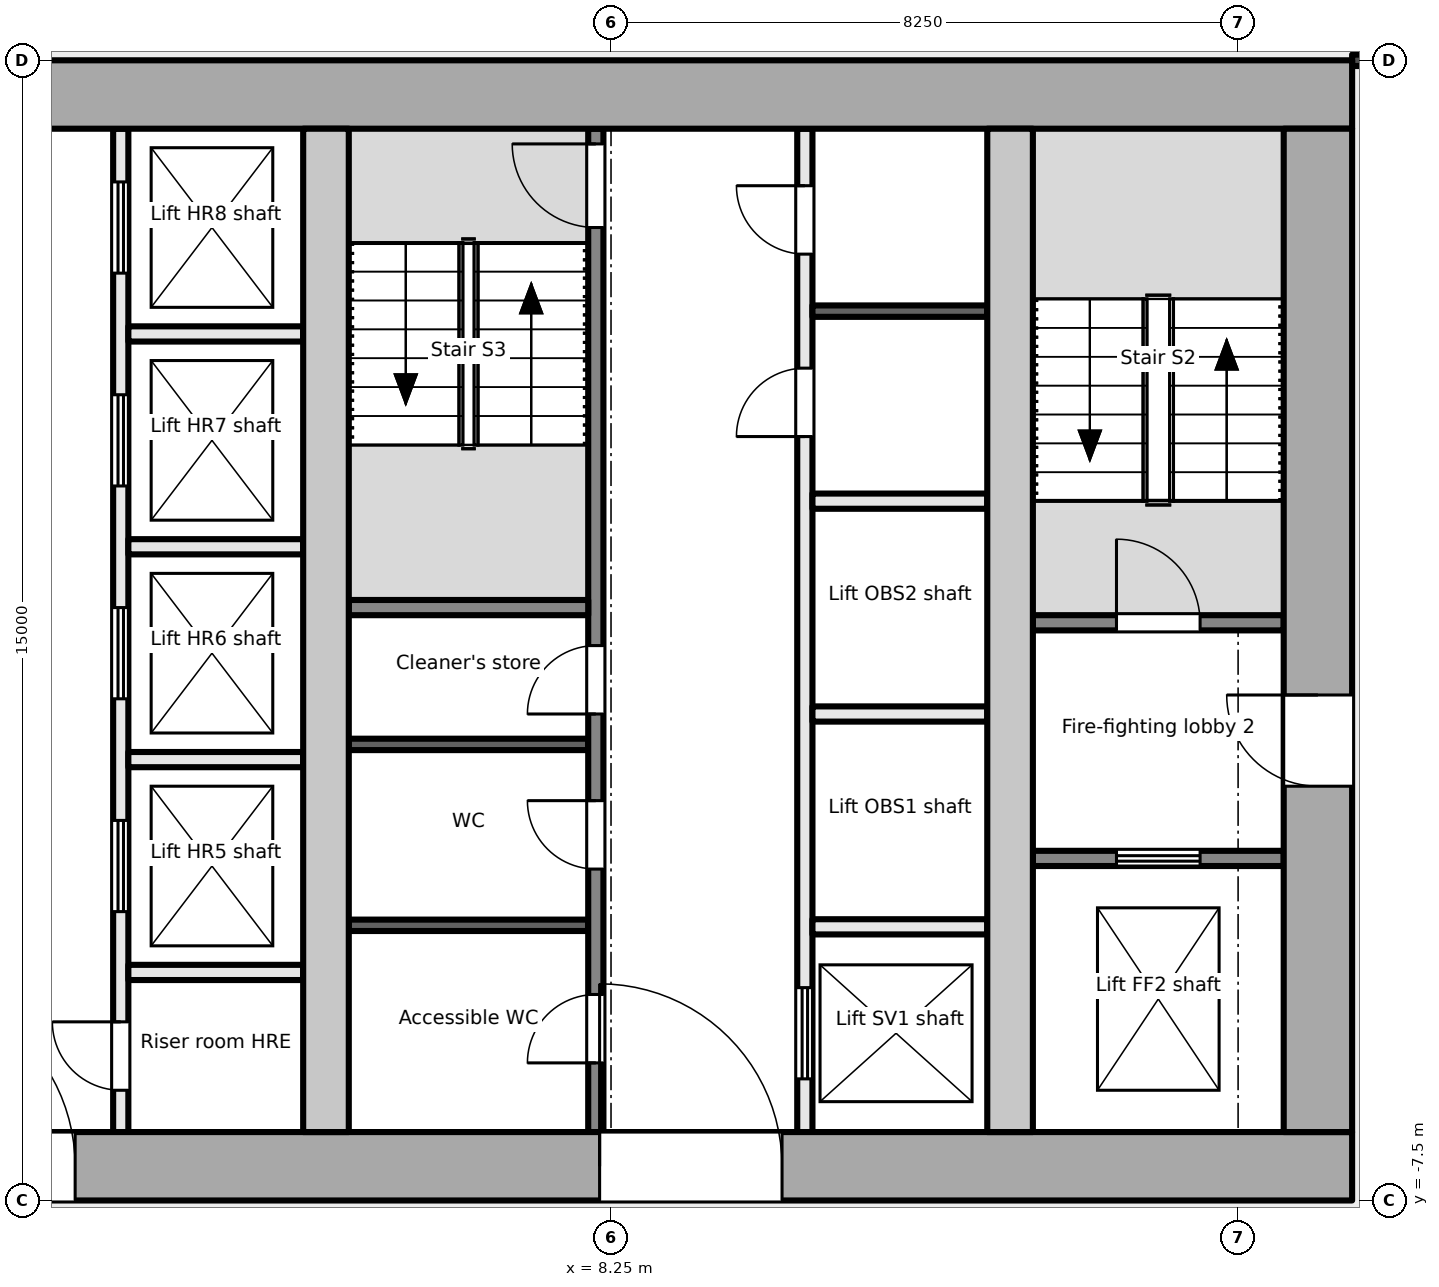
"""IFC4 building model, lengths in metres.
Left out: names, types, materials, properties, quantities, classifications, styles, units other than length and angle.
Written with IfcOpenShell. Run it as: python <this file> out.ifc"""

import sys

from ifc_helpers import new_model, si_unit, direction, frame, frame_2d, origin, place, context, subcontext, project, spatial, rectangle, extrude, element, fill, save


model = new_model("IFC4")
c1 = context("Model", 3, precision=1e-05, world=origin(), true_north=direction((0.0, 1.0)))
c2 = subcontext(c1, "Body", "Model", "MODEL_VIEW")
j1 = project(units=[si_unit("LENGTHUNIT", "METRE"), si_unit("PLANEANGLEUNIT", "RADIAN")], contexts=[c1])
p1 = place(None, origin())
s1 = spatial("IfcSite", under=j1, at=p1, CompositionType="ELEMENT")
p2 = place(p1, origin())
s2 = spatial("IfcBuilding", under=s1, at=p2, CompositionType="ELEMENT")
p3 = place(p2, frame((0.0, 0.0, 208.1)))
s3 = spatial("IfcBuildingStorey", under=s2, at=p3, CompositionType="ELEMENT", Elevation=208.1)
p4 = place(p3, frame((-18.0, -7.05, -0.2), z_axis=(0.0, 0.0, 1.0), x_axis=(1.0, 0.0, 0.0)))
e1 = element("IfcWall", 1, at=p4, inside=s3, PredefinedType="SHEAR", context=c2, shape_type="SweptSolid", body=[
    extrude(rectangle(XDim=36.0, YDim=0.9, at=frame_2d((18.0, 0.0))), origin(), (0.0, 0.0, 1.0), 5.4),
])
p5 = place(p4, frame((8.1, 0.0, 0.2)))
e2 = element("IfcOpeningElement", 2, at=p5, cuts=e1, PredefinedType="OPENING", context=c2, shape_type="SweptSolid", body=[
    extrude(rectangle(XDim=1.8, YDim=2.1, at=frame_2d((0.9, 1.05))), frame((0.0, 0.46, 0.0), z_axis=(0.0, -1.0, 0.0), x_axis=(1.0, 0.0, 0.0)), (0.0, 0.0, 1.0), 0.921),
])
p6 = place(p4, frame((16.8, 0.0, 0.2)))
e3 = element("IfcOpeningElement", 3, at=p6, cuts=e1, PredefinedType="OPENING", context=c2, shape_type="SweptSolid", body=[
    extrude(rectangle(XDim=2.4, YDim=2.1, at=frame_2d((1.2, 1.05))), frame((0.0, 0.46, 0.0), z_axis=(0.0, -1.0, 0.0), x_axis=(1.0, 0.0, 0.0)), (0.0, 0.0, 1.0), 0.921),
])
p7 = place(p4, frame((26.1, 0.0, 0.2)))
e4 = element("IfcOpeningElement", 4, at=p7, cuts=e1, PredefinedType="OPENING", context=c2, shape_type="SweptSolid", body=[
    extrude(rectangle(XDim=2.4, YDim=2.1, at=frame_2d((1.2, 1.05))), frame((0.0, 0.46, 0.0), z_axis=(0.0, -1.0, 0.0), x_axis=(1.0, 0.0, 0.0)), (0.0, 0.0, 1.0), 0.921),
])
p8 = place(p3, frame((-18.0, 7.05, -0.2), z_axis=(0.0, 0.0, 1.0), x_axis=(1.0, 0.0, 0.0)))
e5 = element("IfcWall", 5, at=p8, inside=s3, PredefinedType="SHEAR", context=c2, shape_type="SweptSolid", body=[
    extrude(rectangle(XDim=36.0, YDim=0.9, at=frame_2d((18.0, 0.0))), origin(), (0.0, 0.0, 1.0), 5.4),
])
p9 = place(p3, frame((17.55, -6.6, -0.2), z_axis=(0.0, 0.0, 1.0), x_axis=(0.0, 1.0, 0.0)))
e6 = element("IfcWall", 6, at=p9, inside=s3, PredefinedType="SHEAR", context=c2, shape_type="SweptSolid", body=[
    extrude(rectangle(XDim=13.2, YDim=0.9, at=frame_2d((6.6, 0.0))), origin(), (0.0, 0.0, 1.0), 5.4),
])
p10 = place(p9, frame((4.55, 0.0, 0.2)))
e7 = element("IfcOpeningElement", 7, at=p10, cuts=e6, PredefinedType="OPENING", context=c2, shape_type="SweptSolid", body=[
    extrude(rectangle(XDim=1.2, YDim=2.1, at=frame_2d((0.6, 1.05))), frame((0.0, 0.46, 0.0), z_axis=(0.0, -1.0, 0.0), x_axis=(1.0, 0.0, 0.0)), (0.0, 0.0, 1.0), 0.921),
])
for number, where, z_axis, x_axis in (
    (8, (4.5, -6.6, -0.2), (0.0, 0.0, 1.0), (0.0, 1.0, 0.0)),
    (9, (13.5, -6.6, -0.2), (0.0, 0.0, 1.0), (0.0, 1.0, 0.0)),
):
    element("IfcWall", number, at=place(p3, frame(where, z_axis=z_axis, x_axis=x_axis)), inside=s3, PredefinedType="SHEAR", context=c2, shape_type="SweptSolid", body=[
        extrude(rectangle(XDim=13.2, YDim=0.6, at=frame_2d((6.6, 0.0))), origin(), (0.0, 0.0, 1.0), 5.4),
    ])
p11 = place(p3, frame((13.8, -3.0, 0.0), z_axis=(0.0, 0.0, 1.0), x_axis=(1.0, 0.0, 0.0)))
e10 = element("IfcWall", 10, at=p11, inside=s3, PredefinedType="PARTITIONING", context=c2, shape_type="SweptSolid", body=[
    extrude(rectangle(XDim=3.3, YDim=0.2, at=frame_2d((1.65, 0.0))), origin(), (0.0, 0.0, 1.0), 5.2),
])
p12 = place(p11, frame((1.1, 0.0, 0.0)))
e11 = element("IfcOpeningElement", 11, at=p12, cuts=e10, PredefinedType="OPENING", context=c2, shape_type="SweptSolid", body=[
    extrude(rectangle(XDim=1.1, YDim=2.1, at=frame_2d((0.55, 1.05))), frame((0.0, 0.111, 0.0), z_axis=(0.0, -1.0, 0.0), x_axis=(1.0, 0.0, 0.0)), (0.0, 0.0, 1.0), 0.221),
])
p13 = place(p3, frame((13.8, 0.1, 0.0), z_axis=(0.0, 0.0, 1.0), x_axis=(1.0, 0.0, 0.0)))
e12 = element("IfcWall", 12, at=p13, inside=s3, PredefinedType="PARTITIONING", context=c2, shape_type="SweptSolid", body=[
    extrude(rectangle(XDim=3.3, YDim=0.2, at=frame_2d((1.65, 0.0))), origin(), (0.0, 0.0, 1.0), 5.2),
])
p14 = place(p13, frame((1.1, 0.0, 0.0)))
e13 = element("IfcOpeningElement", 13, at=p14, cuts=e12, PredefinedType="OPENING", context=c2, shape_type="SweptSolid", body=[
    extrude(rectangle(XDim=1.1, YDim=2.1, at=frame_2d((0.55, 1.05))), frame((0.0, 0.111, 0.0), z_axis=(0.0, -1.0, 0.0), x_axis=(1.0, 0.0, 0.0)), (0.0, 0.0, 1.0), 0.221),
])
p15 = place(p3, frame((1.8, -6.6, 0.0), z_axis=(0.0, 0.0, 1.0), x_axis=(0.0, 1.0, 0.0)))
e14 = element("IfcWall", 14, at=p15, inside=s3, PredefinedType="PARTITIONING", context=c2, shape_type="SweptSolid", body=[
    extrude(rectangle(XDim=13.2, YDim=0.2, at=frame_2d((6.6, 0.0))), origin(), (0.0, 0.0, 1.0), 5.2),
])
p16 = place(p15, frame((0.55, 0.0, 0.0)))
e15 = element("IfcOpeningElement", 15, at=p16, cuts=e14, PredefinedType="OPENING", context=c2, shape_type="SweptSolid", body=[
    extrude(rectangle(XDim=0.9, YDim=2.1, at=frame_2d((0.45, 1.05))), frame((0.0, 0.111, 0.0), z_axis=(0.0, -1.0, 0.0), x_axis=(1.0, 0.0, 0.0)), (0.0, 0.0, 1.0), 0.221),
])
p17 = place(p15, frame((2.9, 0.0, 0.0)))
e16 = element("IfcOpeningElement", 16, at=p17, cuts=e14, PredefinedType="OPENING", context=c2, shape_type="SweptSolid", body=[
    extrude(rectangle(XDim=1.2, YDim=2.1, at=frame_2d((0.6, 1.05))), frame((0.0, 0.111, 0.0), z_axis=(0.0, -1.0, 0.0), x_axis=(1.0, 0.0, 0.0)), (0.0, 0.0, 1.0), 0.221),
])
p18 = place(p15, frame((5.7, 0.0, 0.0)))
e17 = element("IfcOpeningElement", 17, at=p18, cuts=e14, PredefinedType="OPENING", context=c2, shape_type="SweptSolid", body=[
    extrude(rectangle(XDim=1.2, YDim=2.1, at=frame_2d((0.6, 1.05))), frame((0.0, 0.111, 0.0), z_axis=(0.0, -1.0, 0.0), x_axis=(1.0, 0.0, 0.0)), (0.0, 0.0, 1.0), 0.221),
])
p19 = place(p15, frame((8.5, 0.0, 0.0)))
e18 = element("IfcOpeningElement", 18, at=p19, cuts=e14, PredefinedType="OPENING", context=c2, shape_type="SweptSolid", body=[
    extrude(rectangle(XDim=1.2, YDim=2.1, at=frame_2d((0.6, 1.05))), frame((0.0, 0.111, 0.0), z_axis=(0.0, -1.0, 0.0), x_axis=(1.0, 0.0, 0.0)), (0.0, 0.0, 1.0), 0.221),
])
p20 = place(p15, frame((11.3, 0.0, 0.0)))
e19 = element("IfcOpeningElement", 19, at=p20, cuts=e14, PredefinedType="OPENING", context=c2, shape_type="SweptSolid", body=[
    extrude(rectangle(XDim=1.2, YDim=2.1, at=frame_2d((0.6, 1.05))), frame((0.0, 0.111, 0.0), z_axis=(0.0, -1.0, 0.0), x_axis=(1.0, 0.0, 0.0)), (0.0, 0.0, 1.0), 0.221),
])
for number, where, z_axis, x_axis in (
    (20, (1.9, -1.7, 0.0), (0.0, 0.0, 1.0), (1.0, 0.0, 0.0)),
    (21, (1.9, 1.1, 0.0), (0.0, 0.0, 1.0), (1.0, 0.0, 0.0)),
    (22, (1.9, 3.9, 0.0), (0.0, 0.0, 1.0), (1.0, 0.0, 0.0)),
    (23, (1.9, -4.5, 0.0), (0.0, 0.0, 1.0), (1.0, 0.0, 0.0)),
):
    element("IfcWall", number, at=place(p3, frame(where, z_axis=z_axis, x_axis=x_axis)), inside=s3, PredefinedType="PARTITIONING", context=c2, shape_type="SweptSolid", body=[
        extrude(rectangle(XDim=2.3, YDim=0.2, at=frame_2d((1.15, 0.0))), origin(), (0.0, 0.0, 1.0), 5.2),
    ])
p21 = place(p3, frame((8.05, -6.6, 0.0), z_axis=(0.0, 0.0, 1.0), x_axis=(0.0, 1.0, 0.0)))
e24 = element("IfcWall", 24, at=p21, inside=s3, PredefinedType="PARTITIONING", context=c2, shape_type="SweptSolid", body=[
    extrude(rectangle(XDim=13.2, YDim=0.2, at=frame_2d((6.6, 0.0))), origin(), (0.0, 0.0, 1.0), 5.2),
])
p22 = place(p21, frame((0.91, 0.0, 0.0)))
e25 = element("IfcOpeningElement", 25, at=p22, cuts=e24, PredefinedType="OPENING", context=c2, shape_type="SweptSolid", body=[
    extrude(rectangle(XDim=0.9, YDim=2.1, at=frame_2d((0.45, 1.05))), frame((0.0, 0.111, 0.0), z_axis=(0.0, -1.0, 0.0), x_axis=(1.0, 0.0, 0.0)), (0.0, 0.0, 1.0), 0.221),
])
p23 = place(p21, frame((3.46, 0.0, 0.0)))
e26 = element("IfcOpeningElement", 26, at=p23, cuts=e24, PredefinedType="OPENING", context=c2, shape_type="SweptSolid", body=[
    extrude(rectangle(XDim=0.9, YDim=2.1, at=frame_2d((0.45, 1.05))), frame((0.0, 0.111, 0.0), z_axis=(0.0, -1.0, 0.0), x_axis=(1.0, 0.0, 0.0)), (0.0, 0.0, 1.0), 0.221),
])
p24 = place(p21, frame((5.5, 0.0, 0.0)))
e27 = element("IfcOpeningElement", 27, at=p24, cuts=e24, PredefinedType="OPENING", context=c2, shape_type="SweptSolid", body=[
    extrude(rectangle(XDim=0.9, YDim=2.1, at=frame_2d((0.45, 1.05))), frame((0.0, 0.111, 0.0), z_axis=(0.0, -1.0, 0.0), x_axis=(1.0, 0.0, 0.0)), (0.0, 0.0, 1.0), 0.221),
])
p25 = place(p21, frame((11.9, 0.0, 0.0)))
e28 = element("IfcOpeningElement", 28, at=p25, cuts=e24, PredefinedType="OPENING", context=c2, shape_type="SweptSolid", body=[
    extrude(rectangle(XDim=1.1, YDim=2.1, at=frame_2d((0.55, 1.05))), frame((0.0, 0.111, 0.0), z_axis=(0.0, -1.0, 0.0), x_axis=(1.0, 0.0, 0.0)), (0.0, 0.0, 1.0), 0.221),
])
p26 = place(p3, frame((10.8, -6.6, 0.0), z_axis=(0.0, 0.0, 1.0), x_axis=(0.0, 1.0, 0.0)))
e29 = element("IfcWall", 29, at=p26, inside=s3, PredefinedType="PARTITIONING", context=c2, shape_type="SweptSolid", body=[
    extrude(rectangle(XDim=13.2, YDim=0.2, at=frame_2d((6.6, 0.0))), origin(), (0.0, 0.0, 1.0), 5.2),
])
p27 = place(p26, frame((0.7, 0.0, 0.0)))
e30 = element("IfcOpeningElement", 30, at=p27, cuts=e29, PredefinedType="OPENING", context=c2, shape_type="SweptSolid", body=[
    extrude(rectangle(XDim=1.2, YDim=2.1, at=frame_2d((0.6, 1.05))), frame((0.0, 0.111, 0.0), z_axis=(0.0, -1.0, 0.0), x_axis=(1.0, 0.0, 0.0)), (0.0, 0.0, 1.0), 0.221),
])
p28 = place(p26, frame((9.15, 0.0, 0.0)))
e31 = element("IfcOpeningElement", 31, at=p28, cuts=e29, PredefinedType="OPENING", context=c2, shape_type="SweptSolid", body=[
    extrude(rectangle(XDim=0.9, YDim=2.1, at=frame_2d((0.45, 1.05))), frame((0.0, 0.111, 0.0), z_axis=(0.0, -1.0, 0.0), x_axis=(1.0, 0.0, 0.0)), (0.0, 0.0, 1.0), 0.221),
])
p29 = place(p26, frame((11.55, 0.0, 0.0)))
e32 = element("IfcOpeningElement", 32, at=p29, cuts=e29, PredefinedType="OPENING", context=c2, shape_type="SweptSolid", body=[
    extrude(rectangle(XDim=0.9, YDim=2.1, at=frame_2d((0.45, 1.05))), frame((0.0, 0.111, 0.0), z_axis=(0.0, -1.0, 0.0), x_axis=(1.0, 0.0, 0.0)), (0.0, 0.0, 1.0), 0.221),
])
p30 = place(p3, frame((4.8, 0.3, 0.0), z_axis=(0.0, 0.0, 1.0), x_axis=(1.0, 0.0, 0.0)))
e33 = element("IfcWall", 33, at=p30, inside=s3, PredefinedType="PARTITIONING", context=c2, shape_type="SweptSolid", body=[
    extrude(rectangle(XDim=3.15, YDim=0.2, at=frame_2d((1.575, 0.0))), origin(), (0.0, 0.0, 1.0), 5.2),
])
for number, where, z_axis, x_axis in (
    (34, (4.8, -3.88, 0.0), (0.0, 0.0, 1.0), (1.0, 0.0, 0.0)),
    (35, (4.8, -1.5, 0.0), (0.0, 0.0, 1.0), (1.0, 0.0, 0.0)),
):
    element("IfcWall", number, at=place(p3, frame(where, z_axis=z_axis, x_axis=x_axis)), inside=s3, PredefinedType="PARTITIONING", context=c2, shape_type="SweptSolid", body=[
        extrude(rectangle(XDim=3.15, YDim=0.15, at=frame_2d((1.575, 0.0))), origin(), (0.0, 0.0, 1.0), 5.2),
    ])
for number, where, z_axis, x_axis in (
    (36, (10.9, -3.9, 0.0), (0.0, 0.0, 1.0), (1.0, 0.0, 0.0)),
    (37, (10.9, -1.1, 0.0), (0.0, 0.0, 1.0), (1.0, 0.0, 0.0)),
    (38, (10.9, 1.7, 0.0), (0.0, 0.0, 1.0), (1.0, 0.0, 0.0)),
):
    element("IfcWall", number, at=place(p3, frame(where, z_axis=z_axis, x_axis=x_axis)), inside=s3, PredefinedType="PARTITIONING", context=c2, shape_type="SweptSolid", body=[
        extrude(rectangle(XDim=2.3, YDim=0.2, at=frame_2d((1.15, 0.0))), origin(), (0.0, 0.0, 1.0), 5.2),
    ])
p31 = place(p3, frame((10.9, 4.2, 0.0), z_axis=(0.0, 0.0, 1.0), x_axis=(1.0, 0.0, 0.0)))
e39 = element("IfcWall", 39, at=p31, inside=s3, PredefinedType="PARTITIONING", context=c2, shape_type="SweptSolid", body=[
    extrude(rectangle(XDim=2.3, YDim=0.15, at=frame_2d((1.15, 0.0))), origin(), (0.0, 0.0, 1.0), 5.2),
])
p32 = place(p3, frame((18.0, 7.5, 0.0), z_axis=(0.0, 0.0, 1.0), x_axis=(1.0, 0.0, 0.0)))
e40 = element("IfcWall", 40, at=p32, inside=s3, PredefinedType="PARTITIONING", context=c2, shape_type="SweptSolid", body=[
    extrude(rectangle(XDim=3.225, YDim=0.15, at=frame_2d((1.613, 0.0))), origin(), (0.0, 0.0, 1.0), 5.2),
])
p33 = place(p32, frame((0.412, 0.0, 0.0)))
e41 = element("IfcOpeningElement", 41, at=p33, cuts=e40, PredefinedType="OPENING", context=c2, shape_type="SweptSolid", body=[
    extrude(rectangle(XDim=2.4, YDim=2.4, at=frame_2d((1.2, 1.2))), frame((0.0, 0.085, 0.0), z_axis=(0.0, -1.0, 0.0), x_axis=(1.0, 0.0, 0.0)), (0.0, 0.0, 1.0), 0.171),
])
p34 = place(p12, origin())
e42 = element("IfcDoor", 42, at=p34, inside=s3, OperationType="DOUBLE_DOOR_SLIDING", PredefinedType="DOOR", context=c2, shape_type="SweptSolid", body=[
    extrude(rectangle(XDim=1.1, YDim=2.1, at=frame_2d((0.55, 1.05))), frame((0.0, 0.025, 0.0), z_axis=(0.0, -1.0, 0.0), x_axis=(1.0, 0.0, 0.0)), (0.0, 0.0, 1.0), 0.05),
])
fill(e11, e42)
p35 = place(p10, origin())
e43 = element("IfcDoor", 43, at=p35, inside=s3, OperationType="SINGLE_SWING_RIGHT", PredefinedType="DOOR", context=c2, shape_type="SweptSolid", body=[
    extrude(rectangle(XDim=1.2, YDim=2.1, at=frame_2d((0.6, 1.05))), frame((0.0, 0.025, 0.0), z_axis=(0.0, -1.0, 0.0), x_axis=(1.0, 0.0, 0.0)), (0.0, 0.0, 1.0), 0.05),
])
fill(e7, e43)
p36 = place(p14, origin())
e44 = element("IfcDoor", 44, at=p36, inside=s3, OperationType="SINGLE_SWING_LEFT", PredefinedType="DOOR", context=c2, shape_type="SweptSolid", body=[
    extrude(rectangle(XDim=1.1, YDim=2.1, at=frame_2d((0.55, 1.05))), frame((0.0, 0.025, 0.0), z_axis=(0.0, -1.0, 0.0), x_axis=(1.0, 0.0, 0.0)), (0.0, 0.0, 1.0), 0.05),
])
fill(e13, e44)
p37 = place(p16, origin())
e45 = element("IfcDoor", 45, at=p37, inside=s3, OperationType="SINGLE_SWING_RIGHT", PredefinedType="DOOR", context=c2, shape_type="SweptSolid", body=[
    extrude(rectangle(XDim=0.9, YDim=2.1, at=frame_2d((0.45, 1.05))), frame((0.0, 0.025, 0.0), z_axis=(0.0, -1.0, 0.0), x_axis=(1.0, 0.0, 0.0)), (0.0, 0.0, 1.0), 0.05),
])
fill(e15, e45)
p38 = place(p17, origin())
e46 = element("IfcDoor", 46, at=p38, inside=s3, OperationType="DOUBLE_DOOR_SLIDING", PredefinedType="DOOR", context=c2, shape_type="SweptSolid", body=[
    extrude(rectangle(XDim=1.2, YDim=2.1, at=frame_2d((0.6, 1.05))), frame((0.0, 0.025, 0.0), z_axis=(0.0, -1.0, 0.0), x_axis=(1.0, 0.0, 0.0)), (0.0, 0.0, 1.0), 0.05),
])
fill(e16, e46)
p39 = place(p18, origin())
e47 = element("IfcDoor", 47, at=p39, inside=s3, OperationType="DOUBLE_DOOR_SLIDING", PredefinedType="DOOR", context=c2, shape_type="SweptSolid", body=[
    extrude(rectangle(XDim=1.2, YDim=2.1, at=frame_2d((0.6, 1.05))), frame((0.0, 0.025, 0.0), z_axis=(0.0, -1.0, 0.0), x_axis=(1.0, 0.0, 0.0)), (0.0, 0.0, 1.0), 0.05),
])
fill(e17, e47)
p40 = place(p19, origin())
e48 = element("IfcDoor", 48, at=p40, inside=s3, OperationType="DOUBLE_DOOR_SLIDING", PredefinedType="DOOR", context=c2, shape_type="SweptSolid", body=[
    extrude(rectangle(XDim=1.2, YDim=2.1, at=frame_2d((0.6, 1.05))), frame((0.0, 0.025, 0.0), z_axis=(0.0, -1.0, 0.0), x_axis=(1.0, 0.0, 0.0)), (0.0, 0.0, 1.0), 0.05),
])
fill(e18, e48)
p41 = place(p20, origin())
e49 = element("IfcDoor", 49, at=p41, inside=s3, OperationType="DOUBLE_DOOR_SLIDING", PredefinedType="DOOR", context=c2, shape_type="SweptSolid", body=[
    extrude(rectangle(XDim=1.2, YDim=2.1, at=frame_2d((0.6, 1.05))), frame((0.0, 0.025, 0.0), z_axis=(0.0, -1.0, 0.0), x_axis=(1.0, 0.0, 0.0)), (0.0, 0.0, 1.0), 0.05),
])
fill(e19, e49)
p42 = place(p6, origin())
e50 = element("IfcDoor", 50, at=p42, inside=s3, OperationType="DOUBLE_DOOR_DOUBLE_SWING", PredefinedType="DOOR", context=c2, shape_type="SweptSolid", body=[
    extrude(rectangle(XDim=2.4, YDim=2.1, at=frame_2d((1.2, 1.05))), frame((0.0, 0.025, 0.0), z_axis=(0.0, -1.0, 0.0), x_axis=(1.0, 0.0, 0.0)), (0.0, 0.0, 1.0), 0.05),
])
fill(e3, e50)
p43 = place(p22, origin())
e51 = element("IfcDoor", 51, at=p43, inside=s3, OperationType="SINGLE_SWING_LEFT", PredefinedType="DOOR", context=c2, shape_type="SweptSolid", body=[
    extrude(rectangle(XDim=0.9, YDim=2.1, at=frame_2d((0.45, 1.05))), frame((0.0, 0.025, 0.0), z_axis=(0.0, -1.0, 0.0), x_axis=(1.0, 0.0, 0.0)), (0.0, 0.0, 1.0), 0.05),
])
fill(e25, e51)
p44 = place(p23, origin())
e52 = element("IfcDoor", 52, at=p44, inside=s3, OperationType="SINGLE_SWING_RIGHT", PredefinedType="DOOR", context=c2, shape_type="SweptSolid", body=[
    extrude(rectangle(XDim=0.9, YDim=2.1, at=frame_2d((0.45, 1.05))), frame((0.0, 0.025, 0.0), z_axis=(0.0, -1.0, 0.0), x_axis=(1.0, 0.0, 0.0)), (0.0, 0.0, 1.0), 0.05),
])
fill(e26, e52)
p45 = place(p24, origin())
e53 = element("IfcDoor", 53, at=p45, inside=s3, OperationType="SINGLE_SWING_LEFT", PredefinedType="DOOR", context=c2, shape_type="SweptSolid", body=[
    extrude(rectangle(XDim=0.9, YDim=2.1, at=frame_2d((0.45, 1.05))), frame((0.0, 0.025, 0.0), z_axis=(0.0, -1.0, 0.0), x_axis=(1.0, 0.0, 0.0)), (0.0, 0.0, 1.0), 0.05),
])
fill(e27, e53)
p46 = place(p25, origin())
e54 = element("IfcDoor", 54, at=p46, inside=s3, OperationType="SINGLE_SWING_RIGHT", PredefinedType="DOOR", context=c2, shape_type="SweptSolid", body=[
    extrude(rectangle(XDim=1.1, YDim=2.1, at=frame_2d((0.55, 1.05))), frame((0.0, 0.025, 0.0), z_axis=(0.0, -1.0, 0.0), x_axis=(1.0, 0.0, 0.0)), (0.0, 0.0, 1.0), 0.05),
])
fill(e28, e54)
p47 = place(p7, origin())
e55 = element("IfcDoor", 55, at=p47, inside=s3, OperationType="DOUBLE_DOOR_DOUBLE_SWING", PredefinedType="DOOR", context=c2, shape_type="SweptSolid", body=[
    extrude(rectangle(XDim=2.4, YDim=2.1, at=frame_2d((1.2, 1.05))), frame((0.0, 0.025, 0.0), z_axis=(0.0, -1.0, 0.0), x_axis=(1.0, 0.0, 0.0)), (0.0, 0.0, 1.0), 0.05),
])
fill(e4, e55)
p48 = place(p27, origin())
e56 = element("IfcDoor", 56, at=p48, inside=s3, OperationType="DOUBLE_DOOR_SLIDING", PredefinedType="DOOR", context=c2, shape_type="SweptSolid", body=[
    extrude(rectangle(XDim=1.2, YDim=2.1, at=frame_2d((0.6, 1.05))), frame((0.0, 0.025, 0.0), z_axis=(0.0, -1.0, 0.0), x_axis=(1.0, 0.0, 0.0)), (0.0, 0.0, 1.0), 0.05),
])
fill(e30, e56)
p49 = place(p28, origin())
e57 = element("IfcDoor", 57, at=p49, inside=s3, OperationType="SINGLE_SWING_LEFT", PredefinedType="DOOR", context=c2, shape_type="SweptSolid", body=[
    extrude(rectangle(XDim=0.9, YDim=2.1, at=frame_2d((0.45, 1.05))), frame((0.0, 0.025, 0.0), z_axis=(0.0, -1.0, 0.0), x_axis=(1.0, 0.0, 0.0)), (0.0, 0.0, 1.0), 0.05),
])
fill(e31, e57)
p50 = place(p29, origin())
e58 = element("IfcDoor", 58, at=p50, inside=s3, OperationType="SINGLE_SWING_RIGHT", PredefinedType="DOOR", context=c2, shape_type="SweptSolid", body=[
    extrude(rectangle(XDim=0.9, YDim=2.1, at=frame_2d((0.45, 1.05))), frame((0.0, 0.025, 0.0), z_axis=(0.0, -1.0, 0.0), x_axis=(1.0, 0.0, 0.0)), (0.0, 0.0, 1.0), 0.05),
])
fill(e32, e58)
save(model, sys.argv[1])
